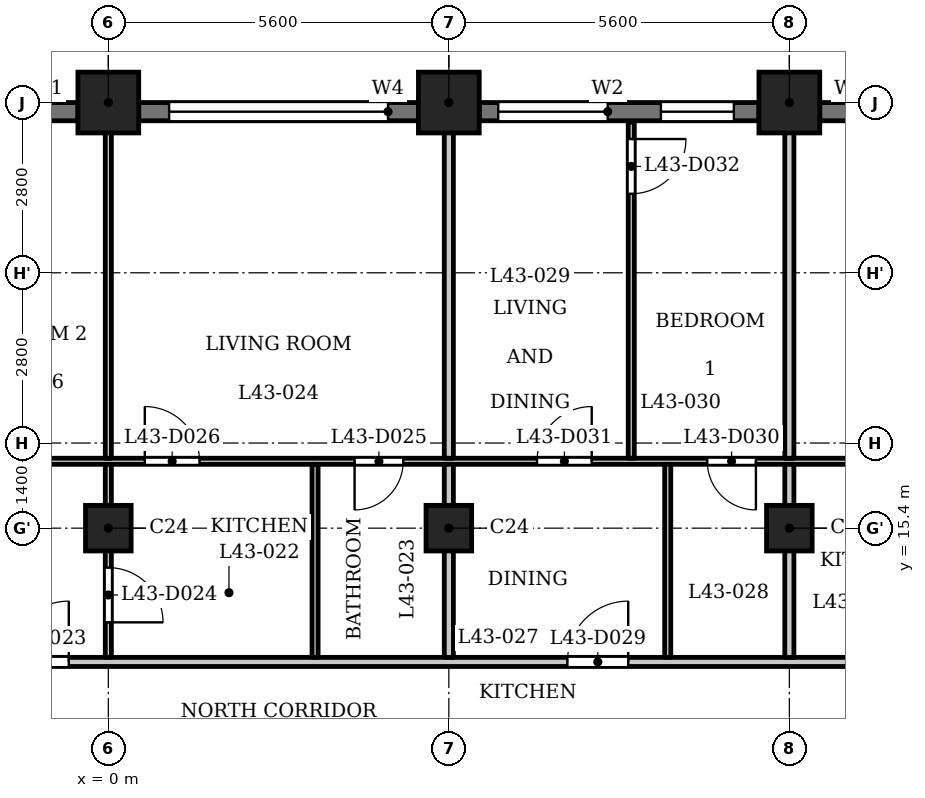
"""IFC4 building model, lengths in metres.
Left out: names, types, materials, properties, quantities, classifications, styles, units other than length and angle.
Written with IfcOpenShell. Run it as: python <this file> out.ifc"""

import sys

from ifc_helpers import new_model, si_unit, direction, frame, frame_2d, origin, origin_2d, place, context, subcontext, project, spatial, rectangle, extrude, element, fill, save


model = new_model("IFC4")
c1 = context("Model", 3, precision=1e-05, world=origin(), true_north=direction((0.0, 1.0)))
c2 = subcontext(c1, "Body", "Model", "MODEL_VIEW")
j1 = project(units=[si_unit("LENGTHUNIT", "METRE"), si_unit("PLANEANGLEUNIT", "RADIAN")], contexts=[c1])
p1 = place(None, origin())
s1 = spatial("IfcSite", under=j1, at=p1, CompositionType="ELEMENT")
p2 = place(p1, origin())
s2 = spatial("IfcBuilding", under=s1, at=p2, CompositionType="ELEMENT")
p3 = place(p2, frame((0.0, 0.0, 167.6)))
s3 = spatial("IfcBuildingStorey", under=s2, at=p3, CompositionType="ELEMENT", Elevation=167.6)
for number, where, z_axis, x_axis in (
    (1, (11.2, 22.4, 0.0), (0.0, 0.0, 1.0), (1.0, 0.0, 0.0)),
    (2, (5.6, 22.4, 0.0), (0.0, 0.0, 1.0), (1.0, 0.0, 0.0)),
    (3, (0.0, 22.4, 0.0), (0.0, 0.0, 1.0), (1.0, 0.0, 0.0)),
):
    element("IfcColumn", number, at=place(p3, frame(where, z_axis=z_axis, x_axis=x_axis)), inside=s3, PredefinedType="COLUMN", context=c2, shape_type="SweptSolid", body=[
        extrude(rectangle(XDim=1.0, YDim=1.0, at=origin_2d()), origin(), (0.0, 0.0, 1.0), 3.5),
    ])
for number, where, z_axis, x_axis in (
    (4, (0.0, 15.4, 0.0), (0.0, 0.0, 1.0), (1.0, 0.0, 0.0)),
    (5, (5.6, 15.4, 0.0), (0.0, 0.0, 1.0), (1.0, 0.0, 0.0)),
    (6, (11.2, 15.4, 0.0), (0.0, 0.0, 1.0), (1.0, 0.0, 0.0)),
):
    element("IfcColumn", number, at=place(p3, frame(where, z_axis=z_axis, x_axis=x_axis)), inside=s3, PredefinedType="COLUMN", context=c2, shape_type="SweptSolid", body=[
        extrude(rectangle(XDim=0.75, YDim=0.75, at=origin_2d()), origin(), (0.0, 0.0, 1.0), 3.5),
    ])
p4 = place(p3, frame((16.3, 22.25, 0.0), z_axis=(0.0, 0.0, 1.0), x_axis=(-1.0, 0.0, 0.0)))
e7 = element("IfcWall", 7, at=p4, inside=s3, PredefinedType="SOLIDWALL", context=c2, shape_type="SweptSolid", body=[
    extrude(rectangle(XDim=4.6, YDim=0.3, at=frame_2d((2.3, 0.0))), origin(), (0.0, 0.0, 1.0), 2.45),
])
p5 = place(p4, frame((0.5, 0.0, 1.2)))
e8 = element("IfcOpeningElement", 8, at=p5, cuts=e7, PredefinedType="OPENING", context=c2, shape_type="SweptSolid", body=[
    extrude(rectangle(XDim=3.6, YDim=0.95, at=frame_2d((1.8, 0.475))), frame((0.0, 0.16, 0.0), z_axis=(0.0, -1.0, 0.0), x_axis=(1.0, 0.0, 0.0)), (0.0, 0.0, 1.0), 0.32),
])
p6 = place(p3, frame((10.7, 22.25, 0.0), z_axis=(0.0, 0.0, 1.0), x_axis=(-1.0, 0.0, 0.0)))
e9 = element("IfcWall", 9, at=p6, inside=s3, PredefinedType="SOLIDWALL", context=c2, shape_type="SweptSolid", body=[
    extrude(rectangle(XDim=4.6, YDim=0.3, at=frame_2d((2.3, 0.0))), origin(), (0.0, 0.0, 1.0), 2.45),
])
p7 = place(p6, frame((0.413, 0.0, 0.6)))
e10 = element("IfcOpeningElement", 10, at=p7, cuts=e9, PredefinedType="OPENING", context=c2, shape_type="SweptSolid", body=[
    extrude(rectangle(XDim=1.2, YDim=1.55, at=frame_2d((0.6, 0.775))), frame((0.0, 0.16, 0.0), z_axis=(0.0, -1.0, 0.0), x_axis=(1.0, 0.0, 0.0)), (0.0, 0.0, 1.0), 0.32),
])
p8 = place(p6, frame((2.488, 0.0, 0.9)))
e11 = element("IfcOpeningElement", 11, at=p8, cuts=e9, PredefinedType="OPENING", context=c2, shape_type="SweptSolid", body=[
    extrude(rectangle(XDim=1.8, YDim=1.25, at=frame_2d((0.9, 0.625))), frame((0.0, 0.16, 0.0), z_axis=(0.0, -1.0, 0.0), x_axis=(1.0, 0.0, 0.0)), (0.0, 0.0, 1.0), 0.32),
])
p9 = place(p3, frame((5.1, 22.25, 0.0), z_axis=(0.0, 0.0, 1.0), x_axis=(-1.0, 0.0, 0.0)))
e12 = element("IfcWall", 12, at=p9, inside=s3, PredefinedType="SOLIDWALL", context=c2, shape_type="SweptSolid", body=[
    extrude(rectangle(XDim=4.6, YDim=0.3, at=frame_2d((2.3, 0.0))), origin(), (0.0, 0.0, 1.0), 2.45),
])
p10 = place(p9, frame((0.5, 0.0, 1.2)))
e13 = element("IfcOpeningElement", 13, at=p10, cuts=e12, PredefinedType="OPENING", context=c2, shape_type="SweptSolid", body=[
    extrude(rectangle(XDim=3.6, YDim=0.95, at=frame_2d((1.8, 0.475))), frame((0.0, 0.16, 0.0), z_axis=(0.0, -1.0, 0.0), x_axis=(1.0, 0.0, 0.0)), (0.0, 0.0, 1.0), 0.32),
])
p11 = place(p3, frame((-0.5, 22.25, 0.0), z_axis=(0.0, 0.0, 1.0), x_axis=(-1.0, 0.0, 0.0)))
e14 = element("IfcWall", 14, at=p11, inside=s3, PredefinedType="SOLIDWALL", context=c2, shape_type="SweptSolid", body=[
    extrude(rectangle(XDim=4.6, YDim=0.3, at=frame_2d((2.3, 0.0))), origin(), (0.0, 0.0, 1.0), 2.45),
])
p12 = place(p11, frame((0.512, 0.0, 0.6)))
e15 = element("IfcOpeningElement", 15, at=p12, cuts=e14, PredefinedType="OPENING", context=c2, shape_type="SweptSolid", body=[
    extrude(rectangle(XDim=1.2, YDim=1.55, at=frame_2d((0.6, 0.775))), frame((0.0, 0.16, 0.0), z_axis=(0.0, -1.0, 0.0), x_axis=(1.0, 0.0, 0.0)), (0.0, 0.0, 1.0), 0.32),
])
p13 = place(p11, frame((2.887, 0.0, 0.6)))
e16 = element("IfcOpeningElement", 16, at=p13, cuts=e14, PredefinedType="OPENING", context=c2, shape_type="SweptSolid", body=[
    extrude(rectangle(XDim=1.2, YDim=1.55, at=frame_2d((0.6, 0.775))), frame((0.0, 0.16, 0.0), z_axis=(0.0, -1.0, 0.0), x_axis=(1.0, 0.0, 0.0)), (0.0, 0.0, 1.0), 0.32),
])
p14 = place(p3, frame((-17.4, 13.2, 0.0), z_axis=(0.0, 0.0, 1.0), x_axis=(1.0, 0.0, 0.0)))
e17 = element("IfcWall", 17, at=p14, inside=s3, PredefinedType="PARTITIONING", context=c2, shape_type="SweptSolid", body=[
    extrude(rectangle(XDim=34.8, YDim=0.15, at=frame_2d((17.4, 0.0))), origin(), (0.0, 0.0, 1.0), 3.2),
])
p15 = place(p14, frame((0.25, 0.0, 0.0)))
e18 = element("IfcOpeningElement", 18, at=p15, cuts=e17, PredefinedType="OPENING", context=c2, shape_type="SweptSolid", body=[
    extrude(rectangle(XDim=1.0, YDim=2.1, at=frame_2d((0.5, 1.05))), frame((0.0, 0.085, 0.0), z_axis=(0.0, -1.0, 0.0), x_axis=(1.0, 0.0, 0.0)), (0.0, 0.0, 1.0), 0.17),
])
p16 = place(p14, frame((33.65, 0.0, 0.0)))
e19 = element("IfcOpeningElement", 19, at=p16, cuts=e17, PredefinedType="OPENING", context=c2, shape_type="SweptSolid", body=[
    extrude(rectangle(XDim=1.0, YDim=2.1, at=frame_2d((0.5, 1.05))), frame((0.0, 0.085, 0.0), z_axis=(0.0, -1.0, 0.0), x_axis=(1.0, 0.0, 0.0)), (0.0, 0.0, 1.0), 0.17),
])
p17 = place(p14, frame((10.15, 0.0, 0.0)))
e20 = element("IfcOpeningElement", 20, at=p17, cuts=e17, PredefinedType="OPENING", context=c2, shape_type="SweptSolid", body=[
    extrude(rectangle(XDim=1.0, YDim=2.1, at=frame_2d((0.5, 1.05))), frame((0.0, 0.085, 0.0), z_axis=(0.0, -1.0, 0.0), x_axis=(1.0, 0.0, 0.0)), (0.0, 0.0, 1.0), 0.17),
])
p18 = place(p14, frame((15.75, 0.0, 0.0)))
e21 = element("IfcOpeningElement", 21, at=p18, cuts=e17, PredefinedType="OPENING", context=c2, shape_type="SweptSolid", body=[
    extrude(rectangle(XDim=1.0, YDim=2.1, at=frame_2d((0.5, 1.05))), frame((0.0, 0.085, 0.0), z_axis=(0.0, -1.0, 0.0), x_axis=(1.0, 0.0, 0.0)), (0.0, 0.0, 1.0), 0.17),
])
p19 = place(p14, frame((24.95, 0.0, 0.0)))
e22 = element("IfcOpeningElement", 22, at=p19, cuts=e17, PredefinedType="OPENING", context=c2, shape_type="SweptSolid", body=[
    extrude(rectangle(XDim=1.0, YDim=2.1, at=frame_2d((0.5, 1.05))), frame((0.0, 0.085, 0.0), z_axis=(0.0, -1.0, 0.0), x_axis=(1.0, 0.0, 0.0)), (0.0, 0.0, 1.0), 0.17),
])
p20 = place(p14, frame((29.95, 0.0, 0.0)))
e23 = element("IfcOpeningElement", 23, at=p20, cuts=e17, PredefinedType="OPENING", context=c2, shape_type="SweptSolid", body=[
    extrude(rectangle(XDim=1.0, YDim=2.1, at=frame_2d((0.5, 1.05))), frame((0.0, 0.085, 0.0), z_axis=(0.0, -1.0, 0.0), x_axis=(1.0, 0.0, 0.0)), (0.0, 0.0, 1.0), 0.17),
])
p21 = place(p3, frame((-16.725, 16.5, 0.0), z_axis=(0.0, 0.0, 1.0), x_axis=(1.0, 0.0, 0.0)))
e24 = element("IfcWall", 24, at=p21, inside=s3, PredefinedType="PARTITIONING", context=c2, shape_type="SweptSolid", body=[
    extrude(rectangle(XDim=33.45, YDim=0.1, at=frame_2d((16.725, 0.0))), origin(), (0.0, 0.0, 1.0), 3.2),
])
p22 = place(p21, frame((0.575, 0.0, 0.0)))
e25 = element("IfcOpeningElement", 25, at=p22, cuts=e24, PredefinedType="OPENING", context=c2, shape_type="SweptSolid", body=[
    extrude(rectangle(XDim=0.8, YDim=2.1, at=frame_2d((0.4, 1.05))), frame((0.0, 0.06, 0.0), z_axis=(0.0, -1.0, 0.0), x_axis=(1.0, 0.0, 0.0)), (0.0, 0.0, 1.0), 0.12),
])
p23 = place(p21, frame((3.225, 0.0, 0.0)))
e26 = element("IfcOpeningElement", 26, at=p23, cuts=e24, PredefinedType="OPENING", context=c2, shape_type="SweptSolid", body=[
    extrude(rectangle(XDim=0.9, YDim=2.1, at=frame_2d((0.45, 1.05))), frame((0.0, 0.06, 0.0), z_axis=(0.0, -1.0, 0.0), x_axis=(1.0, 0.0, 0.0)), (0.0, 0.0, 1.0), 0.12),
])
p24 = place(p21, frame((6.775, 0.0, 0.0)))
e27 = element("IfcOpeningElement", 27, at=p24, cuts=e24, PredefinedType="OPENING", context=c2, shape_type="SweptSolid", body=[
    extrude(rectangle(XDim=0.9, YDim=2.1, at=frame_2d((0.45, 1.05))), frame((0.0, 0.06, 0.0), z_axis=(0.0, -1.0, 0.0), x_axis=(1.0, 0.0, 0.0)), (0.0, 0.0, 1.0), 0.12),
])
p25 = place(p21, frame((8.825, 0.0, 0.0)))
e28 = element("IfcOpeningElement", 28, at=p25, cuts=e24, PredefinedType="OPENING", context=c2, shape_type="SweptSolid", body=[
    extrude(rectangle(XDim=0.9, YDim=2.1, at=frame_2d((0.45, 1.05))), frame((0.0, 0.06, 0.0), z_axis=(0.0, -1.0, 0.0), x_axis=(1.0, 0.0, 0.0)), (0.0, 0.0, 1.0), 0.12),
])
p26 = place(p21, frame((20.775, 0.0, 0.0)))
e29 = element("IfcOpeningElement", 29, at=p26, cuts=e24, PredefinedType="OPENING", context=c2, shape_type="SweptSolid", body=[
    extrude(rectangle(XDim=0.8, YDim=2.1, at=frame_2d((0.4, 1.05))), frame((0.0, 0.06, 0.0), z_axis=(0.0, -1.0, 0.0), x_axis=(1.0, 0.0, 0.0)), (0.0, 0.0, 1.0), 0.12),
])
p27 = place(p21, frame((17.325, 0.0, 0.0)))
e30 = element("IfcOpeningElement", 30, at=p27, cuts=e24, PredefinedType="OPENING", context=c2, shape_type="SweptSolid", body=[
    extrude(rectangle(XDim=0.9, YDim=2.1, at=frame_2d((0.45, 1.05))), frame((0.0, 0.06, 0.0), z_axis=(0.0, -1.0, 0.0), x_axis=(1.0, 0.0, 0.0)), (0.0, 0.0, 1.0), 0.12),
])
p28 = place(p21, frame((12.375, 0.0, 0.0)))
e31 = element("IfcOpeningElement", 31, at=p28, cuts=e24, PredefinedType="OPENING", context=c2, shape_type="SweptSolid", body=[
    extrude(rectangle(XDim=0.9, YDim=2.1, at=frame_2d((0.45, 1.05))), frame((0.0, 0.06, 0.0), z_axis=(0.0, -1.0, 0.0), x_axis=(1.0, 0.0, 0.0)), (0.0, 0.0, 1.0), 0.12),
])
p29 = place(p21, frame((14.425, 0.0, 0.0)))
e32 = element("IfcOpeningElement", 32, at=p29, cuts=e24, PredefinedType="OPENING", context=c2, shape_type="SweptSolid", body=[
    extrude(rectangle(XDim=0.9, YDim=2.1, at=frame_2d((0.45, 1.05))), frame((0.0, 0.06, 0.0), z_axis=(0.0, -1.0, 0.0), x_axis=(1.0, 0.0, 0.0)), (0.0, 0.0, 1.0), 0.12),
])
p30 = place(p21, frame((26.575, 0.0, 0.0)))
e33 = element("IfcOpeningElement", 33, at=p30, cuts=e24, PredefinedType="OPENING", context=c2, shape_type="SweptSolid", body=[
    extrude(rectangle(XDim=0.8, YDim=2.1, at=frame_2d((0.4, 1.05))), frame((0.0, 0.06, 0.0), z_axis=(0.0, -1.0, 0.0), x_axis=(1.0, 0.0, 0.0)), (0.0, 0.0, 1.0), 0.12),
])
p31 = place(p21, frame((23.775, 0.0, 0.0)))
e34 = element("IfcOpeningElement", 34, at=p31, cuts=e24, PredefinedType="OPENING", context=c2, shape_type="SweptSolid", body=[
    extrude(rectangle(XDim=0.9, YDim=2.1, at=frame_2d((0.45, 1.05))), frame((0.0, 0.06, 0.0), z_axis=(0.0, -1.0, 0.0), x_axis=(1.0, 0.0, 0.0)), (0.0, 0.0, 1.0), 0.12),
])
p32 = place(p21, frame((32.075, 0.0, 0.0)))
e35 = element("IfcOpeningElement", 35, at=p32, cuts=e24, PredefinedType="OPENING", context=c2, shape_type="SweptSolid", body=[
    extrude(rectangle(XDim=0.8, YDim=2.1, at=frame_2d((0.4, 1.05))), frame((0.0, 0.06, 0.0), z_axis=(0.0, -1.0, 0.0), x_axis=(1.0, 0.0, 0.0)), (0.0, 0.0, 1.0), 0.12),
])
p33 = place(p21, frame((29.375, 0.0, 0.0)))
e36 = element("IfcOpeningElement", 36, at=p33, cuts=e24, PredefinedType="OPENING", context=c2, shape_type="SweptSolid", body=[
    extrude(rectangle(XDim=0.9, YDim=2.1, at=frame_2d((0.45, 1.05))), frame((0.0, 0.06, 0.0), z_axis=(0.0, -1.0, 0.0), x_axis=(1.0, 0.0, 0.0)), (0.0, 0.0, 1.0), 0.12),
])
p34 = place(p3, frame((0.0, 13.275, 0.0), z_axis=(0.0, 0.0, 1.0), x_axis=(0.0, 1.0, 0.0)))
e37 = element("IfcWall", 37, at=p34, inside=s3, PredefinedType="PARTITIONING", context=c2, shape_type="SweptSolid", body=[
    extrude(rectangle(XDim=3.175, YDim=0.1, at=frame_2d((1.587, 0.0))), origin(), (0.0, 0.0, 1.0), 3.2),
])
p35 = place(p34, frame((0.576, 0.0, 0.0)))
e38 = element("IfcOpeningElement", 38, at=p35, cuts=e37, PredefinedType="OPENING", context=c2, shape_type="SweptSolid", body=[
    extrude(rectangle(XDim=0.9, YDim=2.1, at=frame_2d((0.45, 1.05))), frame((0.0, 0.06, 0.0), z_axis=(0.0, -1.0, 0.0), x_axis=(1.0, 0.0, 0.0)), (0.0, 0.0, 1.0), 0.12),
])
p36 = place(p3, frame((0.0, 16.55, 0.0), z_axis=(0.0, 0.0, 1.0), x_axis=(0.0, 1.0, 0.0)))
e39 = element("IfcWall", 39, at=p36, inside=s3, PredefinedType="PARTITIONING", context=c2, shape_type="SweptSolid", body=[
    extrude(rectangle(XDim=6.33, YDim=0.1, at=frame_2d((3.165, 0.0))), origin(), (0.0, 0.0, 1.0), 3.2),
])
p37 = place(p3, frame((3.4, 13.275, 0.0), z_axis=(0.0, 0.0, 1.0), x_axis=(0.0, 1.0, 0.0)))
e40 = element("IfcWall", 40, at=p37, inside=s3, PredefinedType="PARTITIONING", context=c2, shape_type="SweptSolid", body=[
    extrude(rectangle(XDim=3.175, YDim=0.1, at=frame_2d((1.587, 0.0))), origin(), (0.0, 0.0, 1.0), 3.2),
])
p38 = place(p3, frame((5.6, 13.275, 0.0), z_axis=(0.0, 0.0, 1.0), x_axis=(0.0, 1.0, 0.0)))
e41 = element("IfcWall", 41, at=p38, inside=s3, PredefinedType="PARTITIONING", context=c2, shape_type="SweptSolid", body=[
    extrude(rectangle(XDim=3.175, YDim=0.15, at=frame_2d((1.587, 0.0))), origin(), (0.0, 0.0, 1.0), 3.2),
])
p39 = place(p3, frame((5.6, 16.55, 0.0), z_axis=(0.0, 0.0, 1.0), x_axis=(0.0, 1.0, 0.0)))
e42 = element("IfcWall", 42, at=p39, inside=s3, PredefinedType="PARTITIONING", context=c2, shape_type="SweptSolid", body=[
    extrude(rectangle(XDim=6.33, YDim=0.15, at=frame_2d((3.165, 0.0))), origin(), (0.0, 0.0, 1.0), 3.2),
])
p40 = place(p3, frame((8.6, 16.55, 0.0), z_axis=(0.0, 0.0, 1.0), x_axis=(0.0, 1.0, 0.0)))
e43 = element("IfcWall", 43, at=p40, inside=s3, PredefinedType="PARTITIONING", context=c2, shape_type="SweptSolid", body=[
    extrude(rectangle(XDim=5.53, YDim=0.1, at=frame_2d((2.765, 0.0))), origin(), (0.0, 0.0, 1.0), 3.2),
])
p41 = place(p40, frame((4.35, 0.0, 0.0)))
e44 = element("IfcOpeningElement", 44, at=p41, cuts=e43, PredefinedType="OPENING", context=c2, shape_type="SweptSolid", body=[
    extrude(rectangle(XDim=0.9, YDim=2.1, at=frame_2d((0.45, 1.05))), frame((0.0, 0.06, 0.0), z_axis=(0.0, -1.0, 0.0), x_axis=(1.0, 0.0, 0.0)), (0.0, 0.0, 1.0), 0.12),
])
p42 = place(p3, frame((9.2, 13.275, 0.0), z_axis=(0.0, 0.0, 1.0), x_axis=(0.0, 1.0, 0.0)))
e45 = element("IfcWall", 45, at=p42, inside=s3, PredefinedType="PARTITIONING", context=c2, shape_type="SweptSolid", body=[
    extrude(rectangle(XDim=3.175, YDim=0.1, at=frame_2d((1.587, 0.0))), origin(), (0.0, 0.0, 1.0), 3.2),
])
p43 = place(p3, frame((11.2, 13.275, 0.0), z_axis=(0.0, 0.0, 1.0), x_axis=(0.0, 1.0, 0.0)))
e46 = element("IfcWall", 46, at=p43, inside=s3, PredefinedType="PARTITIONING", context=c2, shape_type="SweptSolid", body=[
    extrude(rectangle(XDim=3.175, YDim=0.15, at=frame_2d((1.587, 0.0))), origin(), (0.0, 0.0, 1.0), 3.2),
])
p44 = place(p3, frame((11.2, 16.55, 0.0), z_axis=(0.0, 0.0, 1.0), x_axis=(0.0, 1.0, 0.0)))
e47 = element("IfcWall", 47, at=p44, inside=s3, PredefinedType="PARTITIONING", context=c2, shape_type="SweptSolid", body=[
    extrude(rectangle(XDim=6.33, YDim=0.15, at=frame_2d((3.165, 0.0))), origin(), (0.0, 0.0, 1.0), 3.2),
])
p45 = place(p18, origin())
e48 = element("IfcDoor", 48, at=p45, inside=s3, OperationType="SINGLE_SWING_LEFT", PredefinedType="DOOR", context=c2, shape_type="SweptSolid", body=[
    extrude(rectangle(XDim=1.0, YDim=2.1, at=frame_2d((0.5, 1.05))), frame((0.0, 0.025, 0.0), z_axis=(0.0, -1.0, 0.0), x_axis=(1.0, 0.0, 0.0)), (0.0, 0.0, 1.0), 0.05),
])
fill(e21, e48)
p46 = place(p35, origin())
e49 = element("IfcDoor", 49, at=p46, inside=s3, OperationType="SINGLE_SWING_LEFT", PredefinedType="DOOR", context=c2, shape_type="SweptSolid", body=[
    extrude(rectangle(XDim=0.9, YDim=2.1, at=frame_2d((0.45, 1.05))), frame((0.0, 0.025, 0.0), z_axis=(0.0, -1.0, 0.0), x_axis=(1.0, 0.0, 0.0)), (0.0, 0.0, 1.0), 0.05),
])
fill(e38, e49)
p47 = place(p26, origin())
e50 = element("IfcDoor", 50, at=p47, inside=s3, OperationType="SINGLE_SWING_LEFT", PredefinedType="DOOR", context=c2, shape_type="SweptSolid", body=[
    extrude(rectangle(XDim=0.8, YDim=2.1, at=frame_2d((0.4, 1.05))), frame((0.0, 0.025, 0.0), z_axis=(0.0, -1.0, 0.0), x_axis=(1.0, 0.0, 0.0)), (0.0, 0.0, 1.0), 0.05),
])
fill(e29, e50)
p48 = place(p27, origin())
e51 = element("IfcDoor", 51, at=p48, inside=s3, OperationType="SINGLE_SWING_RIGHT", PredefinedType="DOOR", context=c2, shape_type="SweptSolid", body=[
    extrude(rectangle(XDim=0.9, YDim=2.1, at=frame_2d((0.45, 1.05))), frame((0.0, 0.025, 0.0), z_axis=(0.0, -1.0, 0.0), x_axis=(1.0, 0.0, 0.0)), (0.0, 0.0, 1.0), 0.05),
])
fill(e30, e51)
p49 = place(p19, origin())
e52 = element("IfcDoor", 52, at=p49, inside=s3, OperationType="SINGLE_SWING_LEFT", PredefinedType="DOOR", context=c2, shape_type="SweptSolid", body=[
    extrude(rectangle(XDim=1.0, YDim=2.1, at=frame_2d((0.5, 1.05))), frame((0.0, 0.025, 0.0), z_axis=(0.0, -1.0, 0.0), x_axis=(1.0, 0.0, 0.0)), (0.0, 0.0, 1.0), 0.05),
])
fill(e22, e52)
p50 = place(p30, origin())
e53 = element("IfcDoor", 53, at=p50, inside=s3, OperationType="SINGLE_SWING_RIGHT", PredefinedType="DOOR", context=c2, shape_type="SweptSolid", body=[
    extrude(rectangle(XDim=0.8, YDim=2.1, at=frame_2d((0.4, 1.05))), frame((0.0, 0.025, 0.0), z_axis=(0.0, -1.0, 0.0), x_axis=(1.0, 0.0, 0.0)), (0.0, 0.0, 1.0), 0.05),
])
fill(e33, e53)
p51 = place(p31, origin())
e54 = element("IfcDoor", 54, at=p51, inside=s3, OperationType="SINGLE_SWING_LEFT", PredefinedType="DOOR", context=c2, shape_type="SweptSolid", body=[
    extrude(rectangle(XDim=0.9, YDim=2.1, at=frame_2d((0.45, 1.05))), frame((0.0, 0.025, 0.0), z_axis=(0.0, -1.0, 0.0), x_axis=(1.0, 0.0, 0.0)), (0.0, 0.0, 1.0), 0.05),
])
fill(e34, e54)
p52 = place(p41, origin())
e55 = element("IfcDoor", 55, at=p52, inside=s3, OperationType="SINGLE_SWING_RIGHT", PredefinedType="DOOR", context=c2, shape_type="SweptSolid", body=[
    extrude(rectangle(XDim=0.9, YDim=2.1, at=frame_2d((0.45, 1.05))), frame((0.0, 0.025, 0.0), z_axis=(0.0, -1.0, 0.0), x_axis=(1.0, 0.0, 0.0)), (0.0, 0.0, 1.0), 0.05),
])
fill(e44, e55)
p53 = place(p7, origin())
e56 = element("IfcWindow", 56, at=p53, inside=s3, PartitioningType="SINGLE_PANEL", PredefinedType="WINDOW", context=c2, shape_type="SweptSolid", body=[
    extrude(rectangle(XDim=1.2, YDim=1.55, at=frame_2d((0.6, 0.775))), frame((0.0, 0.03, 0.0), z_axis=(0.0, -1.0, 0.0), x_axis=(1.0, 0.0, 0.0)), (0.0, 0.0, 1.0), 0.06),
])
fill(e10, e56)
p54 = place(p8, origin())
e57 = element("IfcWindow", 57, at=p54, inside=s3, PartitioningType="SINGLE_PANEL", PredefinedType="WINDOW", context=c2, shape_type="SweptSolid", body=[
    extrude(rectangle(XDim=1.8, YDim=1.25, at=frame_2d((0.9, 0.625))), frame((0.0, 0.03, 0.0), z_axis=(0.0, -1.0, 0.0), x_axis=(1.0, 0.0, 0.0)), (0.0, 0.0, 1.0), 0.06),
])
fill(e11, e57)
p55 = place(p10, origin())
e58 = element("IfcWindow", 58, at=p55, inside=s3, PartitioningType="SINGLE_PANEL", PredefinedType="WINDOW", context=c2, shape_type="SweptSolid", body=[
    extrude(rectangle(XDim=3.6, YDim=0.95, at=frame_2d((1.8, 0.475))), frame((0.0, 0.03, 0.0), z_axis=(0.0, -1.0, 0.0), x_axis=(1.0, 0.0, 0.0)), (0.0, 0.0, 1.0), 0.06),
])
fill(e13, e58)
save(model, sys.argv[1])
